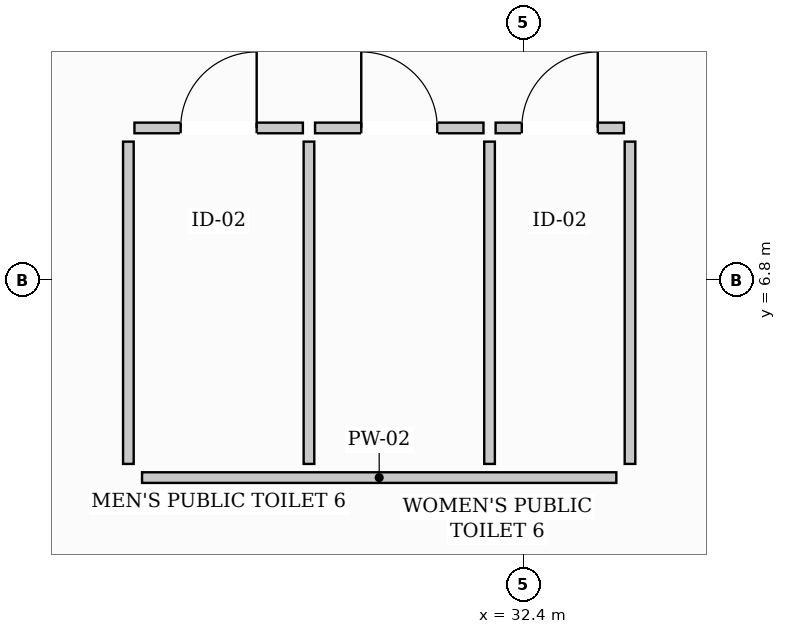
"""IFC4 building model, lengths in metres.
Left out: names, types, materials, properties, quantities, classifications, styles, units other than length and angle.
Written with IfcOpenShell. Run it as: python <this file> out.ifc"""

import sys

from ifc_helpers import new_model, si_unit, direction, frame, frame_2d, origin, place, context, subcontext, project, spatial, rectangle, extrude, element, fill, save


model = new_model("IFC4")
c1 = context("Model", 3, precision=1e-05, world=origin(), true_north=direction((0.0, 1.0)))
c2 = subcontext(c1, "Body", "Model", "MODEL_VIEW")
j1 = project(units=[si_unit("LENGTHUNIT", "METRE"), si_unit("PLANEANGLEUNIT", "RADIAN")], contexts=[c1])
p1 = place(None, origin())
s1 = spatial("IfcSite", under=j1, at=p1, CompositionType="ELEMENT")
p2 = place(p1, origin())
s2 = spatial("IfcBuilding", under=s1, at=p2, CompositionType="ELEMENT")
p3 = place(p2, origin())
s3 = spatial("IfcBuildingStorey", under=s2, at=p3, CompositionType="ELEMENT", Elevation=0.0)
p4 = place(p3, frame((27.38, 4.2, 0.0), z_axis=(0.0, 0.0, 1.0), x_axis=(1.0, 0.0, 0.0)))
e1 = element("IfcWall", 1, at=p4, inside=s3, PredefinedType="PARTITIONING", context=c2, shape_type="SweptSolid", body=[
    extrude(rectangle(XDim=6.24, YDim=0.14, at=frame_2d((3.12, 0.0))), origin(), (0.0, 0.0, 1.0), 4.23),
])
for number, where, z_axis, x_axis in (
    (2, (27.2, 4.38, 0.0), (0.0, 0.0, 1.0), (0.0, 1.0, 0.0)),
    (3, (33.8, 4.38, 0.0), (0.0, 0.0, 1.0), (0.0, 1.0, 0.0)),
    (4, (29.576, 4.38, 0.0), (0.0, 0.0, 1.0), (0.0, 1.0, 0.0)),
    (5, (31.952, 4.38, 0.0), (0.0, 0.0, 1.0), (0.0, 1.0, 0.0)),
):
    element("IfcWall", number, at=place(p3, frame(where, z_axis=z_axis, x_axis=x_axis)), inside=s3, PredefinedType="PARTITIONING", context=c2, shape_type="SweptSolid", body=[
        extrude(rectangle(XDim=4.24, YDim=0.14, at=frame_2d((2.12, 0.0))), origin(), (0.0, 0.0, 1.0), 3.18),
    ])
p5 = place(p3, frame((27.28, 8.8, 0.0), z_axis=(0.0, 0.0, 1.0), x_axis=(1.0, 0.0, 0.0)))
e6 = element("IfcWall", 6, at=p5, inside=s3, PredefinedType="PARTITIONING", context=c2, shape_type="SweptSolid", body=[
    extrude(rectangle(XDim=2.216, YDim=0.14, at=frame_2d((1.108, 0.0))), origin(), (0.0, 0.0, 1.0), 4.78),
])
p6 = place(p5, frame((0.608, 0.0, 0.0)))
e7 = element("IfcOpeningElement", 7, at=p6, cuts=e6, PredefinedType="OPENING", context=c2, shape_type="SweptSolid", body=[
    extrude(rectangle(XDim=1.0, YDim=2.15, at=frame_2d((0.5, 1.075))), frame((0.0, 0.08, 0.0), z_axis=(0.0, -1.0, 0.0), x_axis=(1.0, 0.0, 0.0)), (0.0, 0.0, 1.0), 0.16),
])
p7 = place(p3, frame((29.656, 8.8, 0.0), z_axis=(0.0, 0.0, 1.0), x_axis=(1.0, 0.0, 0.0)))
e8 = element("IfcWall", 8, at=p7, inside=s3, PredefinedType="PARTITIONING", context=c2, shape_type="SweptSolid", body=[
    extrude(rectangle(XDim=2.216, YDim=0.14, at=frame_2d((1.108, 0.0))), origin(), (0.0, 0.0, 1.0), 4.78),
])
p8 = place(p7, frame((0.608, 0.0, 0.0)))
e9 = element("IfcOpeningElement", 9, at=p8, cuts=e8, PredefinedType="OPENING", context=c2, shape_type="SweptSolid", body=[
    extrude(rectangle(XDim=1.0, YDim=2.15, at=frame_2d((0.5, 1.075))), frame((0.0, 0.08, 0.0), z_axis=(0.0, -1.0, 0.0), x_axis=(1.0, 0.0, 0.0)), (0.0, 0.0, 1.0), 0.16),
])
p9 = place(p3, frame((32.032, 8.8, 0.0), z_axis=(0.0, 0.0, 1.0), x_axis=(1.0, 0.0, 0.0)))
e10 = element("IfcWall", 10, at=p9, inside=s3, PredefinedType="PARTITIONING", context=c2, shape_type="SweptSolid", body=[
    extrude(rectangle(XDim=1.688, YDim=0.14, at=frame_2d((0.844, 0.0))), origin(), (0.0, 0.0, 1.0), 4.13),
])
p10 = place(p9, frame((0.344, 0.0, 0.0)))
e11 = element("IfcOpeningElement", 11, at=p10, cuts=e10, PredefinedType="OPENING", context=c2, shape_type="SweptSolid", body=[
    extrude(rectangle(XDim=1.0, YDim=2.15, at=frame_2d((0.5, 1.075))), frame((0.0, 0.08, 0.0), z_axis=(0.0, -1.0, 0.0), x_axis=(1.0, 0.0, 0.0)), (0.0, 0.0, 1.0), 0.16),
])
p11 = place(p6, origin())
e12 = element("IfcDoor", 12, at=p11, inside=s3, OperationType="SINGLE_SWING_RIGHT", PredefinedType="DOOR", context=c2, shape_type="SweptSolid", body=[
    extrude(rectangle(XDim=1.0, YDim=2.15, at=frame_2d((0.5, 1.075))), frame((0.0, 0.025, 0.0), z_axis=(0.0, -1.0, 0.0), x_axis=(1.0, 0.0, 0.0)), (0.0, 0.0, 1.0), 0.05),
])
fill(e7, e12)
p12 = place(p8, origin())
e13 = element("IfcDoor", 13, at=p12, inside=s3, OperationType="SINGLE_SWING_LEFT", PredefinedType="DOOR", context=c2, shape_type="SweptSolid", body=[
    extrude(rectangle(XDim=1.0, YDim=2.15, at=frame_2d((0.5, 1.075))), frame((0.0, 0.025, 0.0), z_axis=(0.0, -1.0, 0.0), x_axis=(1.0, 0.0, 0.0)), (0.0, 0.0, 1.0), 0.05),
])
fill(e9, e13)
p13 = place(p10, origin())
e14 = element("IfcDoor", 14, at=p13, inside=s3, OperationType="SINGLE_SWING_RIGHT", PredefinedType="DOOR", context=c2, shape_type="SweptSolid", body=[
    extrude(rectangle(XDim=1.0, YDim=2.15, at=frame_2d((0.5, 1.075))), frame((0.0, 0.025, 0.0), z_axis=(0.0, -1.0, 0.0), x_axis=(1.0, 0.0, 0.0)), (0.0, 0.0, 1.0), 0.05),
])
fill(e11, e14)
save(model, sys.argv[1])
